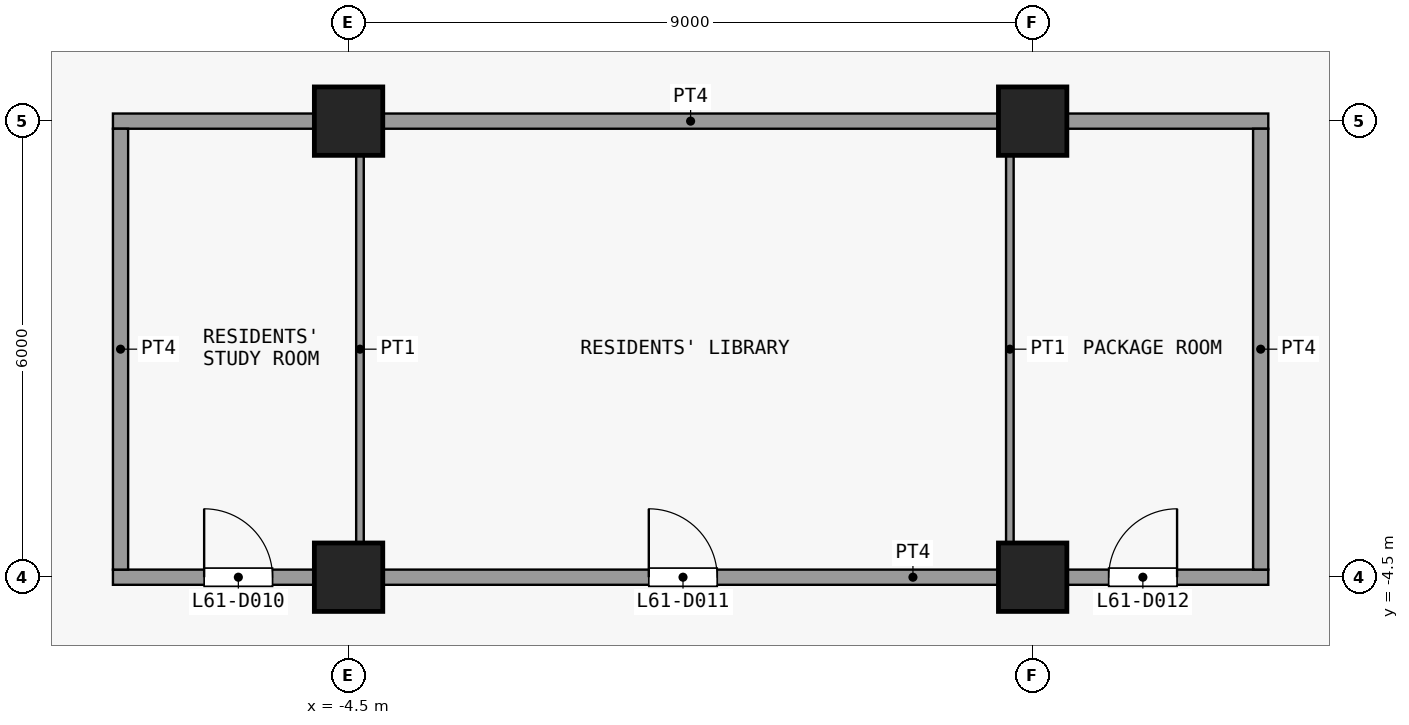
"""IFC4 building model, lengths in metres.
Left out: names, types, materials, properties, quantities, classifications, styles, units other than length and angle.
Written with IfcOpenShell. Run it as: python <this file> out.ifc"""

import sys

from ifc_helpers import new_model, si_unit, direction, frame, frame_2d, origin, origin_2d, place, context, subcontext, project, spatial, rectangle, extrude, element, fill, save


model = new_model("IFC4")
c1 = context("Model", 3, precision=1e-05, world=origin(), true_north=direction((0.0, 1.0)))
c2 = subcontext(c1, "Body", "Model", "MODEL_VIEW")
j1 = project(units=[si_unit("LENGTHUNIT", "METRE"), si_unit("PLANEANGLEUNIT", "RADIAN")], contexts=[c1])
p1 = place(None, origin())
s1 = spatial("IfcSite", under=j1, at=p1, CompositionType="ELEMENT")
p2 = place(p1, origin())
s2 = spatial("IfcBuilding", under=s1, at=p2, CompositionType="ELEMENT")
p3 = place(p2, frame((0.0, 0.0, 241.1)))
s3 = spatial("IfcBuildingStorey", under=s2, at=p3, CompositionType="ELEMENT", Elevation=241.1)
for number, where, z_axis, x_axis in (
    (1, (-4.5, -4.5, 0.0), (0.0, 0.0, 1.0), (1.0, 0.0, 0.0)),
    (2, (-4.5, 1.5, 0.0), (0.0, 0.0, 1.0), (1.0, 0.0, 0.0)),
    (3, (4.5, -4.5, 0.0), (0.0, 0.0, 1.0), (1.0, 0.0, 0.0)),
    (4, (4.5, 1.5, 0.0), (0.0, 0.0, 1.0), (1.0, 0.0, 0.0)),
):
    element("IfcColumn", number, at=place(p3, frame(where, z_axis=z_axis, x_axis=x_axis)), inside=s3, PredefinedType="COLUMN", context=c2, shape_type="SweptSolid", body=[
        extrude(rectangle(XDim=0.9, YDim=0.9, at=origin_2d()), origin(), (0.0, 0.0, 1.0), 3.6),
    ])
p4 = place(p3, frame((-7.6, -4.5, 0.0), z_axis=(0.0, 0.0, 1.0), x_axis=(1.0, 0.0, 0.0)))
e5 = element("IfcWall", 5, at=p4, inside=s3, PredefinedType="PARTITIONING", context=c2, shape_type="SweptSolid", body=[
    extrude(rectangle(XDim=15.2, YDim=0.2, at=frame_2d((7.6, 0.0))), origin(), (0.0, 0.0, 1.0), 3.3),
])
p5 = place(p4, frame((1.2, 0.0, 0.0)))
e6 = element("IfcOpeningElement", 6, at=p5, cuts=e5, PredefinedType="OPENING", context=c2, shape_type="SweptSolid", body=[
    extrude(rectangle(XDim=0.9, YDim=2.1, at=frame_2d((0.45, 1.05))), frame((0.0, 0.11, 0.0), z_axis=(0.0, -1.0, 0.0), x_axis=(1.0, 0.0, 0.0)), (0.0, 0.0, 1.0), 0.22),
])
p6 = place(p4, frame((7.05, 0.0, 0.0)))
e7 = element("IfcOpeningElement", 7, at=p6, cuts=e5, PredefinedType="OPENING", context=c2, shape_type="SweptSolid", body=[
    extrude(rectangle(XDim=0.9, YDim=2.1, at=frame_2d((0.45, 1.05))), frame((0.0, 0.11, 0.0), z_axis=(0.0, -1.0, 0.0), x_axis=(1.0, 0.0, 0.0)), (0.0, 0.0, 1.0), 0.22),
])
p7 = place(p4, frame((13.1, 0.0, 0.0)))
e8 = element("IfcOpeningElement", 8, at=p7, cuts=e5, PredefinedType="OPENING", context=c2, shape_type="SweptSolid", body=[
    extrude(rectangle(XDim=0.9, YDim=2.1, at=frame_2d((0.45, 1.05))), frame((0.0, 0.11, 0.0), z_axis=(0.0, -1.0, 0.0), x_axis=(1.0, 0.0, 0.0)), (0.0, 0.0, 1.0), 0.22),
])
p8 = place(p3, frame((-7.6, 1.5, 0.0), z_axis=(0.0, 0.0, 1.0), x_axis=(1.0, 0.0, 0.0)))
e9 = element("IfcWall", 9, at=p8, inside=s3, PredefinedType="PARTITIONING", context=c2, shape_type="SweptSolid", body=[
    extrude(rectangle(XDim=15.2, YDim=0.2, at=frame_2d((7.6, 0.0))), origin(), (0.0, 0.0, 1.0), 3.3),
])
p9 = place(p3, frame((-7.5, -4.4, 0.0), z_axis=(0.0, 0.0, 1.0), x_axis=(0.0, 1.0, 0.0)))
e10 = element("IfcWall", 10, at=p9, inside=s3, PredefinedType="PARTITIONING", context=c2, shape_type="SweptSolid", body=[
    extrude(rectangle(XDim=5.8, YDim=0.2, at=frame_2d((2.9, 0.0))), origin(), (0.0, 0.0, 1.0), 3.3),
])
for number, where, z_axis, x_axis in (
    (11, (-4.35, -4.4, 0.0), (0.0, 0.0, 1.0), (0.0, 1.0, 0.0)),
    (12, (4.2, -4.4, 0.0), (0.0, 0.0, 1.0), (0.0, 1.0, 0.0)),
):
    element("IfcWall", number, at=place(p3, frame(where, z_axis=z_axis, x_axis=x_axis)), inside=s3, PredefinedType="PARTITIONING", context=c2, shape_type="SweptSolid", body=[
        extrude(rectangle(XDim=5.8, YDim=0.1, at=frame_2d((2.9, 0.0))), origin(), (0.0, 0.0, 1.0), 3.3),
    ])
p10 = place(p3, frame((7.5, -4.4, 0.0), z_axis=(0.0, 0.0, 1.0), x_axis=(0.0, 1.0, 0.0)))
e13 = element("IfcWall", 13, at=p10, inside=s3, PredefinedType="PARTITIONING", context=c2, shape_type="SweptSolid", body=[
    extrude(rectangle(XDim=5.8, YDim=0.2, at=frame_2d((2.9, 0.0))), origin(), (0.0, 0.0, 1.0), 3.3),
])
p11 = place(p5, origin())
e14 = element("IfcDoor", 14, at=p11, inside=s3, OperationType="SINGLE_SWING_RIGHT", PredefinedType="DOOR", context=c2, shape_type="SweptSolid", body=[
    extrude(rectangle(XDim=0.9, YDim=2.1, at=frame_2d((0.45, 1.05))), frame((0.0, 0.025, 0.0), z_axis=(0.0, -1.0, 0.0), x_axis=(1.0, 0.0, 0.0)), (0.0, 0.0, 1.0), 0.05),
])
fill(e6, e14)
p12 = place(p6, origin())
e15 = element("IfcDoor", 15, at=p12, inside=s3, OperationType="SINGLE_SWING_RIGHT", PredefinedType="DOOR", context=c2, shape_type="SweptSolid", body=[
    extrude(rectangle(XDim=0.9, YDim=2.1, at=frame_2d((0.45, 1.05))), frame((0.0, 0.025, 0.0), z_axis=(0.0, -1.0, 0.0), x_axis=(1.0, 0.0, 0.0)), (0.0, 0.0, 1.0), 0.05),
])
fill(e7, e15)
p13 = place(p7, origin())
e16 = element("IfcDoor", 16, at=p13, inside=s3, OperationType="SINGLE_SWING_LEFT", PredefinedType="DOOR", context=c2, shape_type="SweptSolid", body=[
    extrude(rectangle(XDim=0.9, YDim=2.1, at=frame_2d((0.45, 1.05))), frame((0.0, 0.025, 0.0), z_axis=(0.0, -1.0, 0.0), x_axis=(1.0, 0.0, 0.0)), (0.0, 0.0, 1.0), 0.05),
])
fill(e8, e16)
save(model, sys.argv[1])
